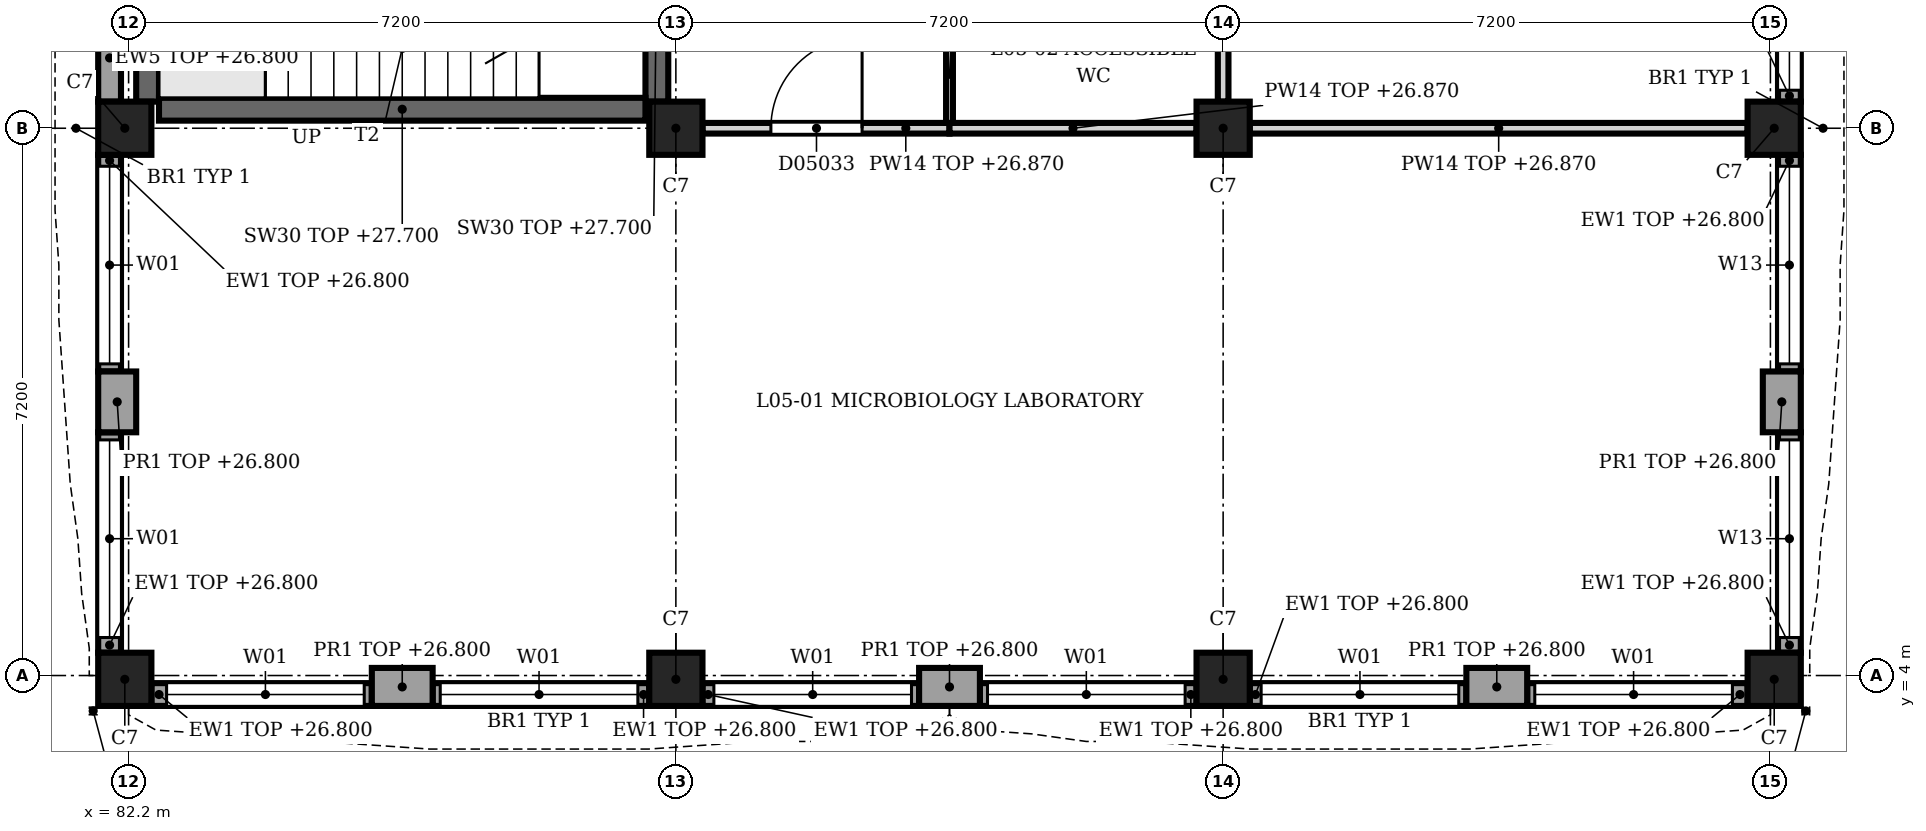
"""IFC4 building model, lengths in metres.
Left out: names, types, materials, properties, quantities, classifications, styles, units other than length and angle.
Written with IfcOpenShell. Run it as: python <this file> out.ifc"""

import sys

from ifc_helpers import new_model, si_unit, direction, frame, frame_2d, origin, origin_2d, place, context, subcontext, project, spatial, rectangle, extrude, element, fill, save


model = new_model("IFC4")
c1 = context("Model", 3, precision=1e-05, world=origin(), true_north=direction((0.0, 1.0)))
c2 = subcontext(c1, "Body", "Model", "MODEL_VIEW")
j1 = project(units=[si_unit("LENGTHUNIT", "METRE"), si_unit("PLANEANGLEUNIT", "RADIAN")], contexts=[c1])
p1 = place(None, origin())
s1 = spatial("IfcSite", under=j1, at=p1, CompositionType="ELEMENT")
p2 = place(p1, origin())
s2 = spatial("IfcBuilding", under=s1, at=p2, CompositionType="ELEMENT")
p3 = place(p2, frame((0.0, 0.0, 23.4)))
s3 = spatial("IfcBuildingStorey", under=s2, at=p3, CompositionType="ELEMENT", Elevation=23.4)
for number, where, z_axis, x_axis in (
    (1, (82.15, 3.95, 0.0), (0.0, 0.0, 1.0), (1.0, 0.0, 0.0)),
    (2, (82.15, 11.2, 0.0), (0.0, 0.0, 1.0), (1.0, 0.0, 0.0)),
    (3, (89.4, 3.95, 0.0), (0.0, 0.0, 1.0), (1.0, 0.0, 0.0)),
    (4, (89.4, 11.2, 0.0), (0.0, 0.0, 1.0), (1.0, 0.0, 0.0)),
    (5, (96.6, 3.95, 0.0), (0.0, 0.0, 1.0), (1.0, 0.0, 0.0)),
    (6, (96.6, 11.2, 0.0), (0.0, 0.0, 1.0), (1.0, 0.0, 0.0)),
    (7, (103.85, 3.95, 0.0), (0.0, 0.0, 1.0), (1.0, 0.0, 0.0)),
    (8, (103.85, 11.2, 0.0), (0.0, 0.0, 1.0), (1.0, 0.0, 0.0)),
):
    element("IfcColumn", number, at=place(p3, frame(where, z_axis=z_axis, x_axis=x_axis)), inside=s3, PredefinedType="COLUMN", context=c2, shape_type="SweptSolid", body=[
        extrude(rectangle(XDim=0.7, YDim=0.7, at=origin_2d()), origin(), (0.0, 0.0, 1.0), 4.5),
    ])
p4 = place(p3, frame((103.95, 8.0, 0.0), z_axis=(0.0, 0.0, 1.0), x_axis=(0.0, -1.0, 0.0)))
e9 = element("IfcWall", 9, at=p4, inside=s3, PredefinedType="SOLIDWALL", context=c2, shape_type="SweptSolid", body=[
    extrude(rectangle(XDim=0.8, YDim=0.5, at=frame_2d((0.4, 0.0))), origin(), (0.0, 0.0, 1.0), 3.4),
])
p5 = place(p3, frame((104.05, 14.4, 0.0), z_axis=(0.0, 0.0, 1.0), x_axis=(0.0, -1.0, 0.0)))
e10 = element("IfcWall", 10, at=p5, inside=s3, PredefinedType="SOLIDWALL", context=c2, shape_type="SweptSolid", body=[
    extrude(rectangle(XDim=2.85, YDim=0.3, at=frame_2d((1.425, 0.0))), origin(), (0.0, 0.0, 1.0), 3.4),
])
p6 = place(p5, frame((0.1, 0.0, 0.9)))
e11 = element("IfcOpeningElement", 11, at=p6, cuts=e10, PredefinedType="OPENING", context=c2, shape_type="SweptSolid", body=[
    extrude(rectangle(XDim=2.6, YDim=2.2, at=frame_2d((1.3, 1.1))), frame((0.0, 0.16, 0.0), z_axis=(0.0, -1.0, 0.0), x_axis=(1.0, 0.0, 0.0)), (0.0, 0.0, 1.0), 0.32),
])
p7 = place(p3, frame((104.05, 10.85, 0.0), z_axis=(0.0, 0.0, 1.0), x_axis=(0.0, -1.0, 0.0)))
e12 = element("IfcWall", 12, at=p7, inside=s3, PredefinedType="SOLIDWALL", context=c2, shape_type="SweptSolid", body=[
    extrude(rectangle(XDim=2.85, YDim=0.3, at=frame_2d((1.425, 0.0))), origin(), (0.0, 0.0, 1.0), 3.4),
])
p8 = place(p7, frame((0.15, 0.0, 0.9)))
e13 = element("IfcOpeningElement", 13, at=p8, cuts=e12, PredefinedType="OPENING", context=c2, shape_type="SweptSolid", body=[
    extrude(rectangle(XDim=2.6, YDim=2.2, at=frame_2d((1.3, 1.1))), frame((0.0, 0.16, 0.0), z_axis=(0.0, -1.0, 0.0), x_axis=(1.0, 0.0, 0.0)), (0.0, 0.0, 1.0), 0.32),
])
p9 = place(p3, frame((104.05, 7.2, 0.0), z_axis=(0.0, 0.0, 1.0), x_axis=(0.0, -1.0, 0.0)))
e14 = element("IfcWall", 14, at=p9, inside=s3, PredefinedType="SOLIDWALL", context=c2, shape_type="SweptSolid", body=[
    extrude(rectangle(XDim=2.9, YDim=0.3, at=frame_2d((1.45, 0.0))), origin(), (0.0, 0.0, 1.0), 3.4),
])
p10 = place(p9, frame((0.1, 0.0, 0.9)))
e15 = element("IfcOpeningElement", 15, at=p10, cuts=e14, PredefinedType="OPENING", context=c2, shape_type="SweptSolid", body=[
    extrude(rectangle(XDim=2.6, YDim=2.2, at=frame_2d((1.3, 1.1))), frame((0.0, 0.16, 0.0), z_axis=(0.0, -1.0, 0.0), x_axis=(1.0, 0.0, 0.0)), (0.0, 0.0, 1.0), 0.32),
])
p11 = place(p3, frame((100.6, 3.85, 0.0), z_axis=(0.0, 0.0, 1.0), x_axis=(-1.0, 0.0, 0.0)))
e16 = element("IfcWall", 16, at=p11, inside=s3, PredefinedType="SOLIDWALL", context=c2, shape_type="SweptSolid", body=[
    extrude(rectangle(XDim=0.8, YDim=0.5, at=frame_2d((0.4, 0.0))), origin(), (0.0, 0.0, 1.0), 3.4),
])
p12 = place(p3, frame((93.4, 3.85, 0.0), z_axis=(0.0, 0.0, 1.0), x_axis=(-1.0, 0.0, 0.0)))
e17 = element("IfcWall", 17, at=p12, inside=s3, PredefinedType="SOLIDWALL", context=c2, shape_type="SweptSolid", body=[
    extrude(rectangle(XDim=0.8, YDim=0.5, at=frame_2d((0.4, 0.0))), origin(), (0.0, 0.0, 1.0), 3.4),
])
p13 = place(p3, frame((86.2, 3.85, 0.0), z_axis=(0.0, 0.0, 1.0), x_axis=(-1.0, 0.0, 0.0)))
e18 = element("IfcWall", 18, at=p13, inside=s3, PredefinedType="SOLIDWALL", context=c2, shape_type="SweptSolid", body=[
    extrude(rectangle(XDim=0.8, YDim=0.5, at=frame_2d((0.4, 0.0))), origin(), (0.0, 0.0, 1.0), 3.4),
])
p14 = place(p3, frame((103.5, 3.75, 0.0), z_axis=(0.0, 0.0, 1.0), x_axis=(-1.0, 0.0, 0.0)))
e19 = element("IfcWall", 19, at=p14, inside=s3, PredefinedType="SOLIDWALL", context=c2, shape_type="SweptSolid", body=[
    extrude(rectangle(XDim=2.9, YDim=0.3, at=frame_2d((1.45, 0.0))), origin(), (0.0, 0.0, 1.0), 3.4),
])
p15 = place(p14, frame((0.2, 0.0, 0.9)))
e20 = element("IfcOpeningElement", 20, at=p15, cuts=e19, PredefinedType="OPENING", context=c2, shape_type="SweptSolid", body=[
    extrude(rectangle(XDim=2.6, YDim=2.4, at=frame_2d((1.3, 1.2))), frame((0.0, 0.16, 0.0), z_axis=(0.0, -1.0, 0.0), x_axis=(1.0, 0.0, 0.0)), (0.0, 0.0, 1.0), 0.32),
])
p16 = place(p3, frame((99.8, 3.75, 0.0), z_axis=(0.0, 0.0, 1.0), x_axis=(-1.0, 0.0, 0.0)))
e21 = element("IfcWall", 21, at=p16, inside=s3, PredefinedType="SOLIDWALL", context=c2, shape_type="SweptSolid", body=[
    extrude(rectangle(XDim=2.85, YDim=0.3, at=frame_2d((1.425, 0.0))), origin(), (0.0, 0.0, 1.0), 3.4),
])
p17 = place(p16, frame((0.1, 0.0, 0.9)))
e22 = element("IfcOpeningElement", 22, at=p17, cuts=e21, PredefinedType="OPENING", context=c2, shape_type="SweptSolid", body=[
    extrude(rectangle(XDim=2.6, YDim=2.4, at=frame_2d((1.3, 1.2))), frame((0.0, 0.16, 0.0), z_axis=(0.0, -1.0, 0.0), x_axis=(1.0, 0.0, 0.0)), (0.0, 0.0, 1.0), 0.32),
])
p18 = place(p3, frame((96.25, 3.75, 0.0), z_axis=(0.0, 0.0, 1.0), x_axis=(-1.0, 0.0, 0.0)))
e23 = element("IfcWall", 23, at=p18, inside=s3, PredefinedType="SOLIDWALL", context=c2, shape_type="SweptSolid", body=[
    extrude(rectangle(XDim=2.85, YDim=0.3, at=frame_2d((1.425, 0.0))), origin(), (0.0, 0.0, 1.0), 3.4),
])
p19 = place(p18, frame((0.15, 0.0, 0.9)))
e24 = element("IfcOpeningElement", 24, at=p19, cuts=e23, PredefinedType="OPENING", context=c2, shape_type="SweptSolid", body=[
    extrude(rectangle(XDim=2.6, YDim=2.4, at=frame_2d((1.3, 1.2))), frame((0.0, 0.16, 0.0), z_axis=(0.0, -1.0, 0.0), x_axis=(1.0, 0.0, 0.0)), (0.0, 0.0, 1.0), 0.32),
])
p20 = place(p3, frame((92.6, 3.75, 0.0), z_axis=(0.0, 0.0, 1.0), x_axis=(-1.0, 0.0, 0.0)))
e25 = element("IfcWall", 25, at=p20, inside=s3, PredefinedType="SOLIDWALL", context=c2, shape_type="SweptSolid", body=[
    extrude(rectangle(XDim=2.85, YDim=0.3, at=frame_2d((1.425, 0.0))), origin(), (0.0, 0.0, 1.0), 3.4),
])
p21 = place(p20, frame((0.1, 0.0, 0.9)))
e26 = element("IfcOpeningElement", 26, at=p21, cuts=e25, PredefinedType="OPENING", context=c2, shape_type="SweptSolid", body=[
    extrude(rectangle(XDim=2.6, YDim=2.4, at=frame_2d((1.3, 1.2))), frame((0.0, 0.16, 0.0), z_axis=(0.0, -1.0, 0.0), x_axis=(1.0, 0.0, 0.0)), (0.0, 0.0, 1.0), 0.32),
])
p22 = place(p3, frame((89.05, 3.75, 0.0), z_axis=(0.0, 0.0, 1.0), x_axis=(-1.0, 0.0, 0.0)))
e27 = element("IfcWall", 27, at=p22, inside=s3, PredefinedType="SOLIDWALL", context=c2, shape_type="SweptSolid", body=[
    extrude(rectangle(XDim=2.85, YDim=0.3, at=frame_2d((1.425, 0.0))), origin(), (0.0, 0.0, 1.0), 3.4),
])
p23 = place(p22, frame((0.15, 0.0, 0.9)))
e28 = element("IfcOpeningElement", 28, at=p23, cuts=e27, PredefinedType="OPENING", context=c2, shape_type="SweptSolid", body=[
    extrude(rectangle(XDim=2.6, YDim=2.4, at=frame_2d((1.3, 1.2))), frame((0.0, 0.16, 0.0), z_axis=(0.0, -1.0, 0.0), x_axis=(1.0, 0.0, 0.0)), (0.0, 0.0, 1.0), 0.32),
])
p24 = place(p3, frame((85.4, 3.75, 0.0), z_axis=(0.0, 0.0, 1.0), x_axis=(-1.0, 0.0, 0.0)))
e29 = element("IfcWall", 29, at=p24, inside=s3, PredefinedType="SOLIDWALL", context=c2, shape_type="SweptSolid", body=[
    extrude(rectangle(XDim=2.9, YDim=0.3, at=frame_2d((1.45, 0.0))), origin(), (0.0, 0.0, 1.0), 3.4),
])
p25 = place(p24, frame((0.1, 0.0, 0.9)))
e30 = element("IfcOpeningElement", 30, at=p25, cuts=e29, PredefinedType="OPENING", context=c2, shape_type="SweptSolid", body=[
    extrude(rectangle(XDim=2.6, YDim=2.4, at=frame_2d((1.3, 1.2))), frame((0.0, 0.16, 0.0), z_axis=(0.0, -1.0, 0.0), x_axis=(1.0, 0.0, 0.0)), (0.0, 0.0, 1.0), 0.32),
])
p26 = place(p3, frame((82.05, 7.2, 0.0), z_axis=(0.0, 0.0, 1.0), x_axis=(0.0, 1.0, 0.0)))
e31 = element("IfcWall", 31, at=p26, inside=s3, PredefinedType="SOLIDWALL", context=c2, shape_type="SweptSolid", body=[
    extrude(rectangle(XDim=0.8, YDim=0.5, at=frame_2d((0.4, 0.0))), origin(), (0.0, 0.0, 1.0), 3.4),
])
p27 = place(p3, frame((81.95, 4.3, 0.0), z_axis=(0.0, 0.0, 1.0), x_axis=(0.0, 1.0, 0.0)))
e32 = element("IfcWall", 32, at=p27, inside=s3, PredefinedType="SOLIDWALL", context=c2, shape_type="SweptSolid", body=[
    extrude(rectangle(XDim=2.9, YDim=0.3, at=frame_2d((1.45, 0.0))), origin(), (0.0, 0.0, 1.0), 3.4),
])
p28 = place(p27, frame((0.2, 0.0, 0.9)))
e33 = element("IfcOpeningElement", 33, at=p28, cuts=e32, PredefinedType="OPENING", context=c2, shape_type="SweptSolid", body=[
    extrude(rectangle(XDim=2.6, YDim=2.4, at=frame_2d((1.3, 1.2))), frame((0.0, 0.16, 0.0), z_axis=(0.0, -1.0, 0.0), x_axis=(1.0, 0.0, 0.0)), (0.0, 0.0, 1.0), 0.32),
])
p29 = place(p3, frame((81.95, 8.0, 0.0), z_axis=(0.0, 0.0, 1.0), x_axis=(0.0, 1.0, 0.0)))
e34 = element("IfcWall", 34, at=p29, inside=s3, PredefinedType="SOLIDWALL", context=c2, shape_type="SweptSolid", body=[
    extrude(rectangle(XDim=2.85, YDim=0.3, at=frame_2d((1.425, 0.0))), origin(), (0.0, 0.0, 1.0), 3.4),
])
p30 = place(p29, frame((0.1, 0.0, 0.9)))
e35 = element("IfcOpeningElement", 35, at=p30, cuts=e34, PredefinedType="OPENING", context=c2, shape_type="SweptSolid", body=[
    extrude(rectangle(XDim=2.6, YDim=2.4, at=frame_2d((1.3, 1.2))), frame((0.0, 0.16, 0.0), z_axis=(0.0, -1.0, 0.0), x_axis=(1.0, 0.0, 0.0)), (0.0, 0.0, 1.0), 0.32),
])
p31 = place(p3, frame((81.95, 11.55, 0.0), z_axis=(0.0, 0.0, 1.0), x_axis=(0.0, 1.0, 0.0)))
e36 = element("IfcWall", 36, at=p31, inside=s3, PredefinedType="SOLIDWALL", context=c2, shape_type="SweptSolid", body=[
    extrude(rectangle(XDim=2.85, YDim=0.3, at=frame_2d((1.425, 0.0))), origin(), (0.0, 0.0, 1.0), 3.4),
])
p32 = place(p31, frame((1.15, 0.0, 1.2)))
e37 = element("IfcOpeningElement", 37, at=p32, cuts=e36, PredefinedType="OPENING", context=c2, shape_type="SweptSolid", body=[
    extrude(rectangle(XDim=0.6, YDim=1.8, at=frame_2d((0.3, 0.9))), frame((0.0, 0.16, 0.0), z_axis=(0.0, -1.0, 0.0), x_axis=(1.0, 0.0, 0.0)), (0.0, 0.0, 1.0), 0.32),
])
p33 = place(p3, frame((89.15, 11.55, 0.0), z_axis=(0.0, 0.0, 1.0), x_axis=(0.0, 1.0, 0.0)))
e38 = element("IfcWall", 38, at=p33, inside=s3, PredefinedType="SHEAR", context=c2, shape_type="SweptSolid", body=[
    extrude(rectangle(XDim=6.5, YDim=0.3, at=frame_2d((3.25, 0.0))), origin(), (0.0, 0.0, 1.0), 4.3),
])
p34 = place(p33, frame((4.25, 0.0, 0.0)))
e39 = element("IfcOpeningElement", 39, at=p34, cuts=e38, PredefinedType="OPENING", context=c2, shape_type="SweptSolid", body=[
    extrude(rectangle(XDim=1.2, YDim=2.1, at=frame_2d((0.6, 1.05))), frame((0.0, 0.16, 0.0), z_axis=(0.0, -1.0, 0.0), x_axis=(1.0, 0.0, 0.0)), (0.0, 0.0, 1.0), 0.32),
])
p35 = place(p3, frame((82.45, 11.55, 0.0), z_axis=(0.0, 0.0, 1.0), x_axis=(0.0, 1.0, 0.0)))
e40 = element("IfcWall", 40, at=p35, inside=s3, PredefinedType="SHEAR", context=c2, shape_type="SweptSolid", body=[
    extrude(rectangle(XDim=6.5, YDim=0.3, at=frame_2d((3.25, 0.0))), origin(), (0.0, 0.0, 1.0), 4.3),
])
p36 = place(p35, frame((1.15, 0.0, 1.2)))
e41 = element("IfcOpeningElement", 41, at=p36, cuts=e40, PredefinedType="OPENING", context=c2, shape_type="SweptSolid", body=[
    extrude(rectangle(XDim=0.6, YDim=1.8, at=frame_2d((0.3, 0.9))), frame((0.0, 0.16, 0.0), z_axis=(0.0, -1.0, 0.0), x_axis=(1.0, 0.0, 0.0)), (0.0, 0.0, 1.0), 0.32),
])
p37 = place(p3, frame((82.6, 11.45, 0.0), z_axis=(0.0, 0.0, 1.0), x_axis=(1.0, 0.0, 0.0)))
e42 = element("IfcWall", 42, at=p37, inside=s3, PredefinedType="SHEAR", context=c2, shape_type="SweptSolid", body=[
    extrude(rectangle(XDim=6.4, YDim=0.3, at=frame_2d((3.2, 0.0))), origin(), (0.0, 0.0, 1.0), 4.3),
])
p38 = place(p3, frame((93.0, 11.2, 0.0), z_axis=(0.0, 0.0, 1.0), x_axis=(-1.0, 0.0, 0.0)))
e43 = element("IfcWall", 43, at=p38, inside=s3, PredefinedType="PARTITIONING", context=c2, shape_type="SweptSolid", body=[
    extrude(rectangle(XDim=3.25, YDim=0.14, at=frame_2d((1.625, 0.0))), origin(), (0.0, 0.0, 1.0), 3.47),
])
p39 = place(p38, frame((1.15, 0.0, 0.0)))
e44 = element("IfcOpeningElement", 44, at=p39, cuts=e43, PredefinedType="OPENING", context=c2, shape_type="SweptSolid", body=[
    extrude(rectangle(XDim=1.2, YDim=2.2, at=frame_2d((0.6, 1.1))), frame((0.0, 0.08, 0.0), z_axis=(0.0, -1.0, 0.0), x_axis=(1.0, 0.0, 0.0)), (0.0, 0.0, 1.0), 0.16),
])
p40 = place(p3, frame((93.0, 11.2, 0.0), z_axis=(0.0, 0.0, 1.0), x_axis=(1.0, 0.0, 0.0)))
e45 = element("IfcWall", 45, at=p40, inside=s3, PredefinedType="PARTITIONING", context=c2, shape_type="SweptSolid", body=[
    extrude(rectangle(XDim=3.25, YDim=0.14, at=frame_2d((1.625, 0.0))), origin(), (0.0, 0.0, 1.0), 3.47),
])
p41 = place(p3, frame((96.95, 11.2, 0.0), z_axis=(0.0, 0.0, 1.0), x_axis=(1.0, 0.0, 0.0)))
e46 = element("IfcWall", 46, at=p41, inside=s3, PredefinedType="PARTITIONING", context=c2, shape_type="SweptSolid", body=[
    extrude(rectangle(XDim=6.55, YDim=0.14, at=frame_2d((3.275, 0.0))), origin(), (0.0, 0.0, 1.0), 3.47),
])
p42 = place(p3, frame((93.0, 14.73, 0.0), z_axis=(0.0, 0.0, 1.0), x_axis=(0.0, -1.0, 0.0)))
e47 = element("IfcWall", 47, at=p42, inside=s3, PredefinedType="PARTITIONING", context=c2, shape_type="SweptSolid", body=[
    extrude(rectangle(XDim=3.46, YDim=0.09, at=frame_2d((1.73, 0.0))), origin(), (0.0, 0.0, 1.0), 3.87),
])
p43 = place(p42, frame((1.18, 0.0, 0.0)))
e48 = element("IfcOpeningElement", 48, at=p43, cuts=e47, PredefinedType="OPENING", context=c2, shape_type="SweptSolid", body=[
    extrude(rectangle(XDim=1.0, YDim=2.2, at=frame_2d((0.5, 1.1))), frame((0.0, 0.055, 0.0), z_axis=(0.0, -1.0, 0.0), x_axis=(1.0, 0.0, 0.0)), (0.0, 0.0, 1.0), 0.11),
])
p44 = place(p3, frame((96.6, 11.55, 0.0), z_axis=(0.0, 0.0, 1.0), x_axis=(0.0, 1.0, 0.0)))
e49 = element("IfcWall", 49, at=p44, inside=s3, PredefinedType="PARTITIONING", context=c2, shape_type="SweptSolid", body=[
    extrude(rectangle(XDim=3.18, YDim=0.14, at=frame_2d((1.59, 0.0))), origin(), (0.0, 0.0, 1.0), 3.47),
])
p45 = place(p6, origin())
e50 = element("IfcWindow", 50, at=p45, inside=s3, PartitioningType="SINGLE_PANEL", PredefinedType="WINDOW", context=c2, shape_type="SweptSolid", body=[
    extrude(rectangle(XDim=2.6, YDim=2.2, at=frame_2d((1.3, 1.1))), frame((0.0, 0.03, 0.0), z_axis=(0.0, -1.0, 0.0), x_axis=(1.0, 0.0, 0.0)), (0.0, 0.0, 1.0), 0.06),
])
fill(e11, e50)
p46 = place(p8, origin())
e51 = element("IfcWindow", 51, at=p46, inside=s3, PartitioningType="SINGLE_PANEL", PredefinedType="WINDOW", context=c2, shape_type="SweptSolid", body=[
    extrude(rectangle(XDim=2.6, YDim=2.2, at=frame_2d((1.3, 1.1))), frame((0.0, 0.03, 0.0), z_axis=(0.0, -1.0, 0.0), x_axis=(1.0, 0.0, 0.0)), (0.0, 0.0, 1.0), 0.06),
])
fill(e13, e51)
p47 = place(p10, origin())
e52 = element("IfcWindow", 52, at=p47, inside=s3, PartitioningType="SINGLE_PANEL", PredefinedType="WINDOW", context=c2, shape_type="SweptSolid", body=[
    extrude(rectangle(XDim=2.6, YDim=2.2, at=frame_2d((1.3, 1.1))), frame((0.0, 0.03, 0.0), z_axis=(0.0, -1.0, 0.0), x_axis=(1.0, 0.0, 0.0)), (0.0, 0.0, 1.0), 0.06),
])
fill(e15, e52)
p48 = place(p15, origin())
e53 = element("IfcWindow", 53, at=p48, inside=s3, PartitioningType="SINGLE_PANEL", PredefinedType="WINDOW", context=c2, shape_type="SweptSolid", body=[
    extrude(rectangle(XDim=2.6, YDim=2.4, at=frame_2d((1.3, 1.2))), frame((0.0, 0.03, 0.0), z_axis=(0.0, -1.0, 0.0), x_axis=(1.0, 0.0, 0.0)), (0.0, 0.0, 1.0), 0.06),
])
fill(e20, e53)
p49 = place(p17, origin())
e54 = element("IfcWindow", 54, at=p49, inside=s3, PartitioningType="SINGLE_PANEL", PredefinedType="WINDOW", context=c2, shape_type="SweptSolid", body=[
    extrude(rectangle(XDim=2.6, YDim=2.4, at=frame_2d((1.3, 1.2))), frame((0.0, 0.03, 0.0), z_axis=(0.0, -1.0, 0.0), x_axis=(1.0, 0.0, 0.0)), (0.0, 0.0, 1.0), 0.06),
])
fill(e22, e54)
p50 = place(p19, origin())
e55 = element("IfcWindow", 55, at=p50, inside=s3, PartitioningType="SINGLE_PANEL", PredefinedType="WINDOW", context=c2, shape_type="SweptSolid", body=[
    extrude(rectangle(XDim=2.6, YDim=2.4, at=frame_2d((1.3, 1.2))), frame((0.0, 0.03, 0.0), z_axis=(0.0, -1.0, 0.0), x_axis=(1.0, 0.0, 0.0)), (0.0, 0.0, 1.0), 0.06),
])
fill(e24, e55)
p51 = place(p21, origin())
e56 = element("IfcWindow", 56, at=p51, inside=s3, PartitioningType="SINGLE_PANEL", PredefinedType="WINDOW", context=c2, shape_type="SweptSolid", body=[
    extrude(rectangle(XDim=2.6, YDim=2.4, at=frame_2d((1.3, 1.2))), frame((0.0, 0.03, 0.0), z_axis=(0.0, -1.0, 0.0), x_axis=(1.0, 0.0, 0.0)), (0.0, 0.0, 1.0), 0.06),
])
fill(e26, e56)
p52 = place(p23, origin())
e57 = element("IfcWindow", 57, at=p52, inside=s3, PartitioningType="SINGLE_PANEL", PredefinedType="WINDOW", context=c2, shape_type="SweptSolid", body=[
    extrude(rectangle(XDim=2.6, YDim=2.4, at=frame_2d((1.3, 1.2))), frame((0.0, 0.03, 0.0), z_axis=(0.0, -1.0, 0.0), x_axis=(1.0, 0.0, 0.0)), (0.0, 0.0, 1.0), 0.06),
])
fill(e28, e57)
p53 = place(p25, origin())
e58 = element("IfcWindow", 58, at=p53, inside=s3, PartitioningType="SINGLE_PANEL", PredefinedType="WINDOW", context=c2, shape_type="SweptSolid", body=[
    extrude(rectangle(XDim=2.6, YDim=2.4, at=frame_2d((1.3, 1.2))), frame((0.0, 0.03, 0.0), z_axis=(0.0, -1.0, 0.0), x_axis=(1.0, 0.0, 0.0)), (0.0, 0.0, 1.0), 0.06),
])
fill(e30, e58)
p54 = place(p28, origin())
e59 = element("IfcWindow", 59, at=p54, inside=s3, PartitioningType="SINGLE_PANEL", PredefinedType="WINDOW", context=c2, shape_type="SweptSolid", body=[
    extrude(rectangle(XDim=2.6, YDim=2.4, at=frame_2d((1.3, 1.2))), frame((0.0, 0.03, 0.0), z_axis=(0.0, -1.0, 0.0), x_axis=(1.0, 0.0, 0.0)), (0.0, 0.0, 1.0), 0.06),
])
fill(e33, e59)
p55 = place(p30, origin())
e60 = element("IfcWindow", 60, at=p55, inside=s3, PartitioningType="SINGLE_PANEL", PredefinedType="WINDOW", context=c2, shape_type="SweptSolid", body=[
    extrude(rectangle(XDim=2.6, YDim=2.4, at=frame_2d((1.3, 1.2))), frame((0.0, 0.03, 0.0), z_axis=(0.0, -1.0, 0.0), x_axis=(1.0, 0.0, 0.0)), (0.0, 0.0, 1.0), 0.06),
])
fill(e35, e60)
p56 = place(p39, origin())
e61 = element("IfcDoor", 61, at=p56, inside=s3, OperationType="SINGLE_SWING_RIGHT", PredefinedType="DOOR", context=c2, shape_type="SweptSolid", body=[
    extrude(rectangle(XDim=1.2, YDim=2.2, at=frame_2d((0.6, 1.1))), frame((0.0, 0.025, 0.0), z_axis=(0.0, -1.0, 0.0), x_axis=(1.0, 0.0, 0.0)), (0.0, 0.0, 1.0), 0.05),
])
fill(e44, e61)
save(model, sys.argv[1])
